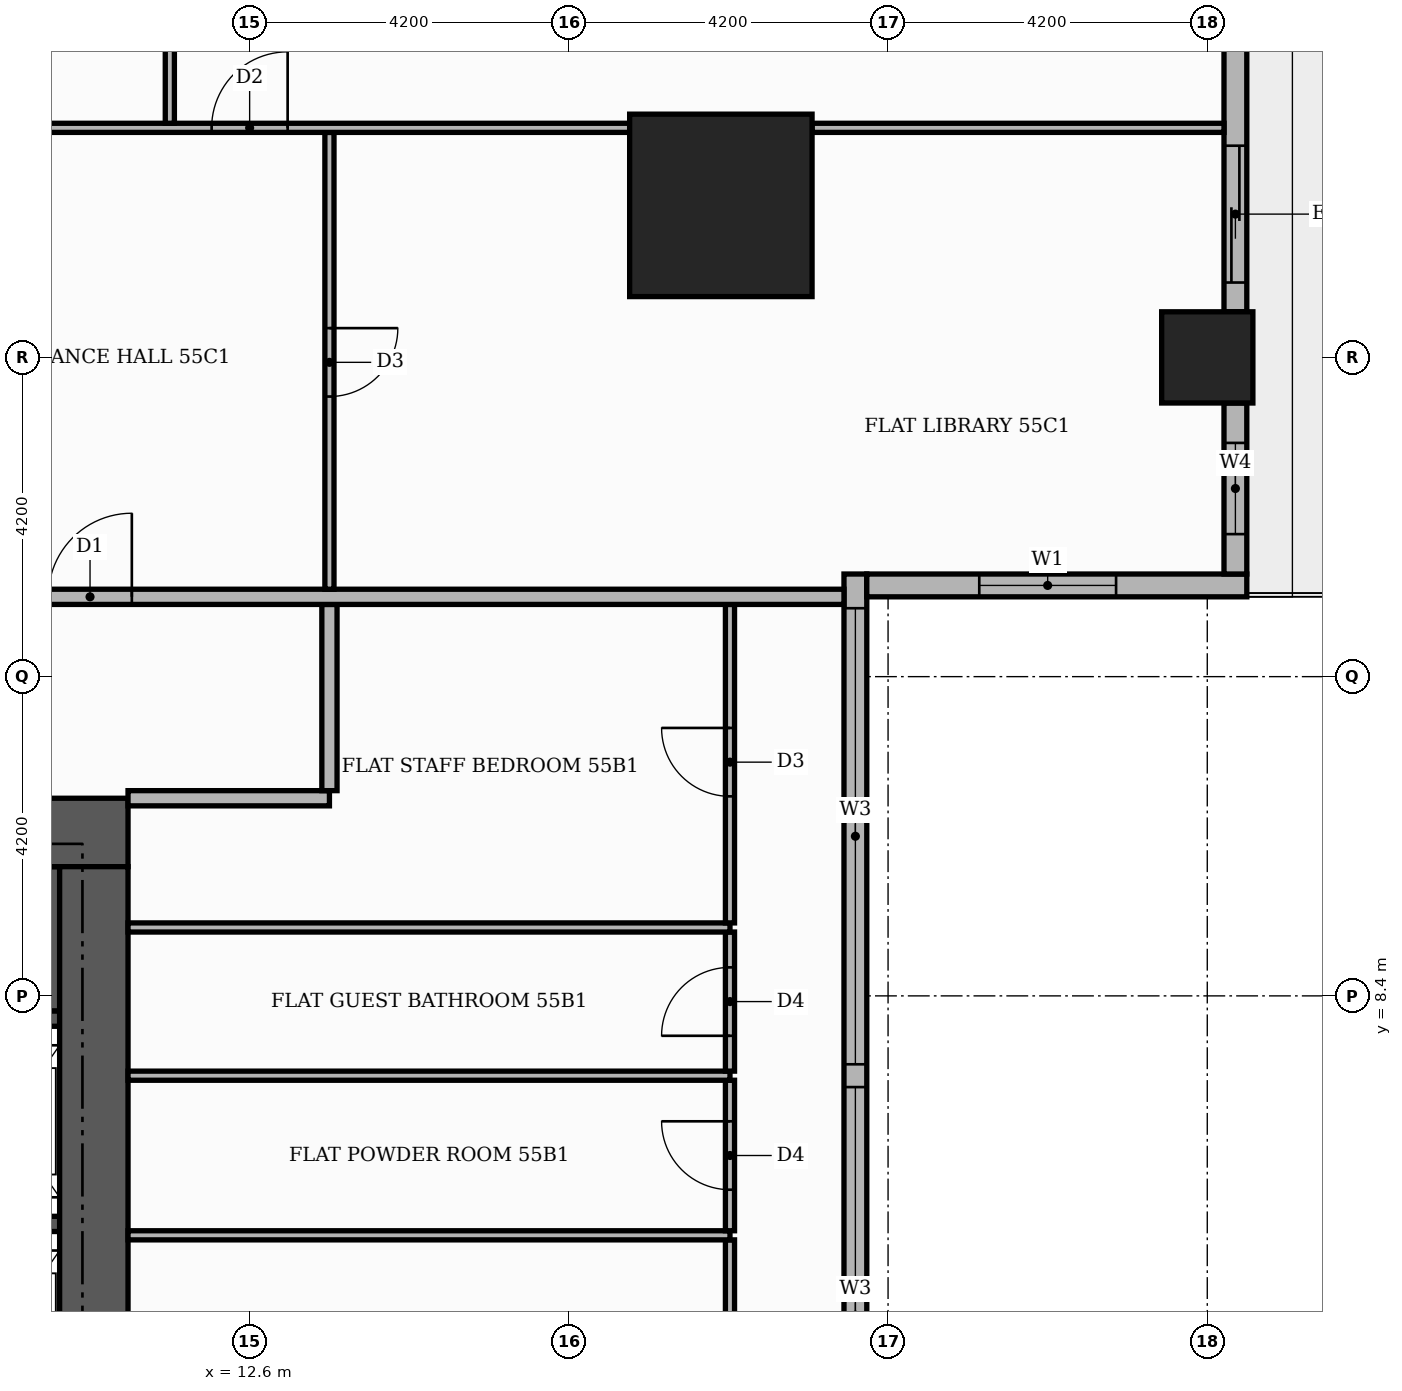
"""IFC4 building model, lengths in metres.
Left out: names, types, materials, properties, quantities, classifications, styles, units other than length and angle.
Written with IfcOpenShell. Run it as: python <this file> out.ifc"""

import sys

from ifc_helpers import new_model, si_unit, direction, frame, frame_2d, origin, origin_2d, place, context, subcontext, project, spatial, rectangle, extrude, element, fill, save


model = new_model("IFC4")
c1 = context("Model", 3, precision=1e-05, world=origin(), true_north=direction((0.0, 1.0)))
c2 = subcontext(c1, "Body", "Model", "MODEL_VIEW")
j1 = project(units=[si_unit("LENGTHUNIT", "METRE"), si_unit("PLANEANGLEUNIT", "RADIAN")], contexts=[c1])
p1 = place(None, origin())
s1 = spatial("IfcSite", under=j1, at=p1, CompositionType="ELEMENT")
p2 = place(p1, origin())
s2 = spatial("IfcBuilding", under=s1, at=p2, CompositionType="ELEMENT")
p3 = place(p2, frame((0.0, 0.0, 231.3)))
s3 = spatial("IfcBuildingStorey", under=s2, at=p3, CompositionType="ELEMENT", Elevation=231.3)
p4 = place(p3, frame((5.5, 9.15, 0.0), z_axis=(0.0, 0.0, 1.0), x_axis=(1.0, 0.0, 0.0)))
e1 = element("IfcWall", 1, at=p4, inside=s3, PredefinedType="SHEAR", context=c2, shape_type="SweptSolid", body=[
    extrude(rectangle(XDim=4.6, YDim=1.9, at=frame_2d((2.3, 0.0))), origin(), (0.0, 0.0, 1.0), 3.4),
])
for number, where, z_axis, x_axis in (
    (2, (8.1, 5.4, 0.0), (0.0, 0.0, 1.0), (1.0, 0.0, 0.0)),
    (3, (8.1, 8.1, 0.0), (0.0, 0.0, 1.0), (1.0, 0.0, 0.0)),
):
    element("IfcWall", number, at=place(p3, frame(where, z_axis=z_axis, x_axis=x_axis)), inside=s3, PredefinedType="SHEAR", context=c2, shape_type="SweptSolid", body=[
        extrude(rectangle(XDim=2.0, YDim=0.2, at=frame_2d((1.0, 0.0))), origin(), (0.0, 0.0, 1.0), 3.4),
    ])
p5 = place(p3, frame((-11.0, 10.55, 0.0), z_axis=(0.0, 0.0, 1.0), x_axis=(1.0, 0.0, 0.0)))
e4 = element("IfcWall", 4, at=p5, inside=s3, PredefinedType="SHEAR", context=c2, shape_type="SweptSolid", body=[
    extrude(rectangle(XDim=22.0, YDim=0.9, at=frame_2d((11.0, 0.0))), origin(), (0.0, 0.0, 1.0), 3.4),
])
p6 = place(p5, frame((13.3, 0.0, 0.0)))
e5 = element("IfcOpeningElement", 5, at=p6, cuts=e4, PredefinedType="OPENING", context=c2, shape_type="SweptSolid", body=[
    extrude(rectangle(XDim=1.8, YDim=2.2, at=frame_2d((0.9, 1.1))), frame((0.0, 0.46, 0.0), z_axis=(0.0, -1.0, 0.0), x_axis=(1.0, 0.0, 0.0)), (0.0, 0.0, 1.0), 0.92),
])
p7 = place(p3, frame((10.55, -10.1, 0.0), z_axis=(0.0, 0.0, 1.0), x_axis=(0.0, 1.0, 0.0)))
e6 = element("IfcWall", 6, at=p7, inside=s3, PredefinedType="SHEAR", context=c2, shape_type="SweptSolid", body=[
    extrude(rectangle(XDim=20.2, YDim=0.9, at=frame_2d((10.1, 0.0))), origin(), (0.0, 0.0, 1.0), 3.4),
])
p8 = place(p3, frame((18.8, 18.8, 0.0), z_axis=(0.0, 0.0, 1.0), x_axis=(1.0, 0.0, 0.0)))
e7 = element("IfcColumn", 7, at=p8, inside=s3, PredefinedType="COLUMN", context=c2, shape_type="SweptSolid", body=[
    extrude(rectangle(XDim=2.4, YDim=2.4, at=origin_2d()), origin(), (0.0, 0.0, 1.0), 3.9),
])
p9 = place(p3, frame((25.2, 16.8, 0.0), z_axis=(0.0, 0.0, 1.0), x_axis=(1.0, 0.0, 0.0)))
e8 = element("IfcColumn", 8, at=p9, inside=s3, PredefinedType="COLUMN", context=c2, shape_type="SweptSolid", body=[
    extrude(rectangle(XDim=1.2, YDim=1.2, at=origin_2d()), origin(), (0.0, 0.0, 1.0), 3.9),
])
p10 = place(p3, frame((20.57, -13.65, 0.0), z_axis=(0.0, 0.0, 1.0), x_axis=(0.0, 1.0, 0.0)))
e9 = element("IfcWall", 9, at=p10, inside=s3, PredefinedType="STANDARD", context=c2, shape_type="SweptSolid", body=[
    extrude(rectangle(XDim=27.6, YDim=0.3, at=frame_2d((13.8, 0.0))), origin(), (0.0, 0.0, 1.0), 3.4),
])
p11 = place(p10, frame((0.15, 0.0, 0.9)))
e10 = element("IfcOpeningElement", 10, at=p11, cuts=e9, PredefinedType="OPENING", context=c2, shape_type="SweptSolid", body=[
    extrude(rectangle(XDim=1.8, YDim=2.1, at=frame_2d((0.9, 1.05))), frame((0.0, 0.16, 0.0), z_axis=(0.0, -1.0, 0.0), x_axis=(1.0, 0.0, 0.0)), (0.0, 0.0, 1.0), 0.32),
])
p12 = place(p10, frame((2.25, 0.0, 0.9)))
e11 = element("IfcOpeningElement", 11, at=p12, cuts=e9, PredefinedType="OPENING", context=c2, shape_type="SweptSolid", body=[
    extrude(rectangle(XDim=6.0, YDim=2.1, at=frame_2d((3.0, 1.05))), frame((0.0, 0.16, 0.0), z_axis=(0.0, -1.0, 0.0), x_axis=(1.0, 0.0, 0.0)), (0.0, 0.0, 1.0), 0.32),
])
p13 = place(p10, frame((8.55, 0.0, 0.9)))
e12 = element("IfcOpeningElement", 12, at=p13, cuts=e9, PredefinedType="OPENING", context=c2, shape_type="SweptSolid", body=[
    extrude(rectangle(XDim=6.0, YDim=2.1, at=frame_2d((3.0, 1.05))), frame((0.0, 0.16, 0.0), z_axis=(0.0, -1.0, 0.0), x_axis=(1.0, 0.0, 0.0)), (0.0, 0.0, 1.0), 0.32),
])
p14 = place(p10, frame((14.85, 0.0, 0.9)))
e13 = element("IfcOpeningElement", 13, at=p14, cuts=e9, PredefinedType="OPENING", context=c2, shape_type="SweptSolid", body=[
    extrude(rectangle(XDim=6.0, YDim=2.1, at=frame_2d((3.0, 1.05))), frame((0.0, 0.16, 0.0), z_axis=(0.0, -1.0, 0.0), x_axis=(1.0, 0.0, 0.0)), (0.0, 0.0, 1.0), 0.32),
])
p15 = place(p10, frame((21.15, 0.0, 0.9)))
e14 = element("IfcOpeningElement", 14, at=p15, cuts=e9, PredefinedType="OPENING", context=c2, shape_type="SweptSolid", body=[
    extrude(rectangle(XDim=6.0, YDim=2.1, at=frame_2d((3.0, 1.05))), frame((0.0, 0.16, 0.0), z_axis=(0.0, -1.0, 0.0), x_axis=(1.0, 0.0, 0.0)), (0.0, 0.0, 1.0), 0.32),
])
p16 = place(p3, frame((20.72, 13.8, 0.0), z_axis=(0.0, 0.0, 1.0), x_axis=(1.0, 0.0, 0.0)))
e15 = element("IfcWall", 15, at=p16, inside=s3, PredefinedType="STANDARD", context=c2, shape_type="SweptSolid", body=[
    extrude(rectangle(XDim=5.0, YDim=0.3, at=frame_2d((2.5, 0.0))), origin(), (0.0, 0.0, 1.0), 3.4),
])
p17 = place(p16, frame((1.48, 0.0, 0.9)))
e16 = element("IfcOpeningElement", 16, at=p17, cuts=e15, PredefinedType="OPENING", context=c2, shape_type="SweptSolid", body=[
    extrude(rectangle(XDim=1.8, YDim=2.1, at=frame_2d((0.9, 1.05))), frame((0.0, 0.16, 0.0), z_axis=(0.0, -1.0, 0.0), x_axis=(1.0, 0.0, 0.0)), (0.0, 0.0, 1.0), 0.32),
])
p18 = place(p3, frame((25.57, 13.95, 0.0), z_axis=(0.0, 0.0, 1.0), x_axis=(0.0, 1.0, 0.0)))
e17 = element("IfcWall", 17, at=p18, inside=s3, PredefinedType="STANDARD", context=c2, shape_type="SweptSolid", body=[
    extrude(rectangle(XDim=2.25, YDim=0.3, at=frame_2d((1.125, 0.0))), origin(), (0.0, 0.0, 1.0), 3.4),
])
p19 = place(p18, frame((0.525, 0.0, 0.9)))
e18 = element("IfcOpeningElement", 18, at=p19, cuts=e17, PredefinedType="OPENING", context=c2, shape_type="SweptSolid", body=[
    extrude(rectangle(XDim=1.2, YDim=2.1, at=frame_2d((0.6, 1.05))), frame((0.0, 0.16, 0.0), z_axis=(0.0, -1.0, 0.0), x_axis=(1.0, 0.0, 0.0)), (0.0, 0.0, 1.0), 0.32),
])
p20 = place(p3, frame((25.57, 17.4, 0.0), z_axis=(0.0, 0.0, 1.0), x_axis=(0.0, 1.0, 0.0)))
e19 = element("IfcWall", 19, at=p20, inside=s3, PredefinedType="STANDARD", context=c2, shape_type="SweptSolid", body=[
    extrude(rectangle(XDim=3.82, YDim=0.3, at=frame_2d((1.91, 0.0))), origin(), (0.0, 0.0, 1.0), 3.4),
])
p21 = place(p20, frame((0.385, 0.0, 0.0)))
e20 = element("IfcOpeningElement", 20, at=p21, cuts=e19, PredefinedType="OPENING", context=c2, shape_type="SweptSolid", body=[
    extrude(rectangle(XDim=1.8, YDim=2.4, at=frame_2d((0.9, 1.2))), frame((0.0, 0.16, 0.0), z_axis=(0.0, -1.0, 0.0), x_axis=(1.0, 0.0, 0.0)), (0.0, 0.0, 1.0), 0.32),
])
p22 = place(p3, frame((18.92, 1.11, 0.0), z_axis=(0.0, 0.0, 1.0), x_axis=(0.0, 1.0, 0.0)))
e21 = element("IfcWall", 21, at=p22, inside=s3, PredefinedType="PARTITIONING", context=c2, shape_type="SweptSolid", body=[
    extrude(rectangle(XDim=4.08, YDim=0.12, at=frame_2d((2.04, 0.0))), origin(), (0.0, 0.0, 1.0), 3.4),
])
p23 = place(p22, frame((1.59, 0.0, 0.0)))
e22 = element("IfcOpeningElement", 22, at=p23, cuts=e21, PredefinedType="OPENING", context=c2, shape_type="SweptSolid", body=[
    extrude(rectangle(XDim=0.9, YDim=2.1, at=frame_2d((0.45, 1.05))), frame((0.0, 0.07, 0.0), z_axis=(0.0, -1.0, 0.0), x_axis=(1.0, 0.0, 0.0)), (0.0, 0.0, 1.0), 0.14),
])
p24 = place(p3, frame((11.0, 5.25, 0.0), z_axis=(0.0, 0.0, 1.0), x_axis=(1.0, 0.0, 0.0)))
e23 = element("IfcWall", 23, at=p24, inside=s3, PredefinedType="PARTITIONING", context=c2, shape_type="SweptSolid", body=[
    extrude(rectangle(XDim=7.92, YDim=0.12, at=frame_2d((3.96, 0.0))), origin(), (0.0, 0.0, 1.0), 3.4),
])
p25 = place(p3, frame((18.92, 5.31, 0.0), z_axis=(0.0, 0.0, 1.0), x_axis=(0.0, 1.0, 0.0)))
e24 = element("IfcWall", 24, at=p25, inside=s3, PredefinedType="PARTITIONING", context=c2, shape_type="SweptSolid", body=[
    extrude(rectangle(XDim=1.98, YDim=0.12, at=frame_2d((0.99, 0.0))), origin(), (0.0, 0.0, 1.0), 3.4),
])
p26 = place(p25, frame((0.54, 0.0, 0.0)))
e25 = element("IfcOpeningElement", 25, at=p26, cuts=e24, PredefinedType="OPENING", context=c2, shape_type="SweptSolid", body=[
    extrude(rectangle(XDim=0.9, YDim=2.1, at=frame_2d((0.45, 1.05))), frame((0.0, 0.07, 0.0), z_axis=(0.0, -1.0, 0.0), x_axis=(1.0, 0.0, 0.0)), (0.0, 0.0, 1.0), 0.14),
])
p27 = place(p3, frame((11.0, 7.35, 0.0), z_axis=(0.0, 0.0, 1.0), x_axis=(1.0, 0.0, 0.0)))
e26 = element("IfcWall", 26, at=p27, inside=s3, PredefinedType="PARTITIONING", context=c2, shape_type="SweptSolid", body=[
    extrude(rectangle(XDim=7.92, YDim=0.12, at=frame_2d((3.96, 0.0))), origin(), (0.0, 0.0, 1.0), 3.4),
])
p28 = place(p3, frame((18.92, 7.41, 0.0), z_axis=(0.0, 0.0, 1.0), x_axis=(0.0, 1.0, 0.0)))
e27 = element("IfcWall", 27, at=p28, inside=s3, PredefinedType="PARTITIONING", context=c2, shape_type="SweptSolid", body=[
    extrude(rectangle(XDim=1.83, YDim=0.12, at=frame_2d((0.915, 0.0))), origin(), (0.0, 0.0, 1.0), 3.4),
])
p29 = place(p28, frame((0.465, 0.0, 0.0)))
e28 = element("IfcOpeningElement", 28, at=p29, cuts=e27, PredefinedType="OPENING", context=c2, shape_type="SweptSolid", body=[
    extrude(rectangle(XDim=0.9, YDim=2.1, at=frame_2d((0.45, 1.05))), frame((0.0, 0.07, 0.0), z_axis=(0.0, -1.0, 0.0), x_axis=(1.0, 0.0, 0.0)), (0.0, 0.0, 1.0), 0.14),
])
p30 = place(p3, frame((11.0, 9.3, 0.0), z_axis=(0.0, 0.0, 1.0), x_axis=(1.0, 0.0, 0.0)))
e29 = element("IfcWall", 29, at=p30, inside=s3, PredefinedType="PARTITIONING", context=c2, shape_type="SweptSolid", body=[
    extrude(rectangle(XDim=7.92, YDim=0.12, at=frame_2d((3.96, 0.0))), origin(), (0.0, 0.0, 1.0), 3.4),
])
p31 = place(p3, frame((18.92, 9.36, 0.0), z_axis=(0.0, 0.0, 1.0), x_axis=(0.0, 1.0, 0.0)))
e30 = element("IfcWall", 30, at=p31, inside=s3, PredefinedType="PARTITIONING", context=c2, shape_type="SweptSolid", body=[
    extrude(rectangle(XDim=4.19, YDim=0.12, at=frame_2d((2.095, 0.0))), origin(), (0.0, 0.0, 1.0), 3.4),
])
p32 = place(p31, frame((1.665, 0.0, 0.0)))
e31 = element("IfcOpeningElement", 31, at=p32, cuts=e30, PredefinedType="OPENING", context=c2, shape_type="SweptSolid", body=[
    extrude(rectangle(XDim=0.9, YDim=2.1, at=frame_2d((0.45, 1.05))), frame((0.0, 0.07, 0.0), z_axis=(0.0, -1.0, 0.0), x_axis=(1.0, 0.0, 0.0)), (0.0, 0.0, 1.0), 0.14),
])
p33 = place(p3, frame((11.0, 11.0, 0.0), z_axis=(0.0, 0.0, 1.0), x_axis=(1.0, 0.0, 0.0)))
e32 = element("IfcWall", 32, at=p33, inside=s3, PredefinedType="PARTITIONING", context=c2, shape_type="SweptSolid", body=[
    extrude(rectangle(XDim=2.65, YDim=0.2, at=frame_2d((1.325, 0.0))), origin(), (0.0, 0.0, 1.0), 3.4),
])
p34 = place(p3, frame((13.65, 11.1, 0.0), z_axis=(0.0, 0.0, 1.0), x_axis=(0.0, 1.0, 0.0)))
e33 = element("IfcWall", 33, at=p34, inside=s3, PredefinedType="PARTITIONING", context=c2, shape_type="SweptSolid", body=[
    extrude(rectangle(XDim=2.45, YDim=0.2, at=frame_2d((1.225, 0.0))), origin(), (0.0, 0.0, 1.0), 3.4),
])
p35 = place(p3, frame((-13.65, 13.65, 0.0), z_axis=(0.0, 0.0, 1.0), x_axis=(1.0, 0.0, 0.0)))
e34 = element("IfcWall", 34, at=p35, inside=s3, PredefinedType="PARTITIONING", context=c2, shape_type="SweptSolid", body=[
    extrude(rectangle(XDim=34.07, YDim=0.2, at=frame_2d((17.035, 0.0))), origin(), (0.0, 0.0, 1.0), 3.4),
])
p36 = place(p35, frame((23.6, 0.0, 0.0)))
e35 = element("IfcOpeningElement", 35, at=p36, cuts=e34, PredefinedType="OPENING", context=c2, shape_type="SweptSolid", body=[
    extrude(rectangle(XDim=1.1, YDim=2.4, at=frame_2d((0.55, 1.2))), frame((0.0, 0.11, 0.0), z_axis=(0.0, -1.0, 0.0), x_axis=(1.0, 0.0, 0.0)), (0.0, 0.0, 1.0), 0.22),
])
p37 = place(p3, frame((13.65, 13.75, 0.0), z_axis=(0.0, 0.0, 1.0), x_axis=(0.0, 1.0, 0.0)))
e36 = element("IfcWall", 36, at=p37, inside=s3, PredefinedType="PARTITIONING", context=c2, shape_type="SweptSolid", body=[
    extrude(rectangle(XDim=6.01, YDim=0.12, at=frame_2d((3.005, 0.0))), origin(), (0.0, 0.0, 1.0), 3.4),
])
p38 = place(p37, frame((2.535, 0.0, 0.0)))
e37 = element("IfcOpeningElement", 37, at=p38, cuts=e36, PredefinedType="OPENING", context=c2, shape_type="SweptSolid", body=[
    extrude(rectangle(XDim=0.9, YDim=2.1, at=frame_2d((0.45, 1.05))), frame((0.0, 0.07, 0.0), z_axis=(0.0, -1.0, 0.0), x_axis=(1.0, 0.0, 0.0)), (0.0, 0.0, 1.0), 0.14),
])
p39 = place(p3, frame((-13.55, 19.82, 0.0), z_axis=(0.0, 0.0, 1.0), x_axis=(1.0, 0.0, 0.0)))
e38 = element("IfcWall", 38, at=p39, inside=s3, PredefinedType="PARTITIONING", context=c2, shape_type="SweptSolid", body=[
    extrude(rectangle(XDim=31.15, YDim=0.12, at=frame_2d((15.575, 0.0))), origin(), (0.0, 0.0, 1.0), 3.4),
])
p40 = place(p39, frame((25.65, 0.0, 0.0)))
e39 = element("IfcOpeningElement", 39, at=p40, cuts=e38, PredefinedType="OPENING", context=c2, shape_type="SweptSolid", body=[
    extrude(rectangle(XDim=1.0, YDim=2.1, at=frame_2d((0.5, 1.05))), frame((0.0, 0.07, 0.0), z_axis=(0.0, -1.0, 0.0), x_axis=(1.0, 0.0, 0.0)), (0.0, 0.0, 1.0), 0.14),
])
p41 = place(p39, frame((22.55, 0.0, 0.0)))
e40 = element("IfcOpeningElement", 40, at=p41, cuts=e38, PredefinedType="OPENING", context=c2, shape_type="SweptSolid", body=[
    extrude(rectangle(XDim=0.9, YDim=2.1, at=frame_2d((0.45, 1.05))), frame((0.0, 0.07, 0.0), z_axis=(0.0, -1.0, 0.0), x_axis=(1.0, 0.0, 0.0)), (0.0, 0.0, 1.0), 0.14),
])
p42 = place(p39, frame((18.35, 0.0, 0.0)))
e41 = element("IfcOpeningElement", 41, at=p42, cuts=e38, PredefinedType="OPENING", context=c2, shape_type="SweptSolid", body=[
    extrude(rectangle(XDim=0.9, YDim=2.1, at=frame_2d((0.45, 1.05))), frame((0.0, 0.07, 0.0), z_axis=(0.0, -1.0, 0.0), x_axis=(1.0, 0.0, 0.0)), (0.0, 0.0, 1.0), 0.14),
])
p43 = place(p39, frame((9.95, 0.0, 0.0)))
e42 = element("IfcOpeningElement", 42, at=p43, cuts=e38, PredefinedType="OPENING", context=c2, shape_type="SweptSolid", body=[
    extrude(rectangle(XDim=0.9, YDim=2.1, at=frame_2d((0.45, 1.05))), frame((0.0, 0.07, 0.0), z_axis=(0.0, -1.0, 0.0), x_axis=(1.0, 0.0, 0.0)), (0.0, 0.0, 1.0), 0.14),
])
p44 = place(p39, frame((3.65, 0.0, 0.0)))
e43 = element("IfcOpeningElement", 43, at=p44, cuts=e38, PredefinedType="OPENING", context=c2, shape_type="SweptSolid", body=[
    extrude(rectangle(XDim=0.9, YDim=2.1, at=frame_2d((0.45, 1.05))), frame((0.0, 0.07, 0.0), z_axis=(0.0, -1.0, 0.0), x_axis=(1.0, 0.0, 0.0)), (0.0, 0.0, 1.0), 0.14),
])
p45 = place(p3, frame((20.0, 19.82, 0.0), z_axis=(0.0, 0.0, 1.0), x_axis=(1.0, 0.0, 0.0)))
e44 = element("IfcWall", 44, at=p45, inside=s3, PredefinedType="PARTITIONING", context=c2, shape_type="SweptSolid", body=[
    extrude(rectangle(XDim=5.42, YDim=0.12, at=frame_2d((2.71, 0.0))), origin(), (0.0, 0.0, 1.0), 3.4),
])
p46 = place(p3, frame((11.55, 19.88, 0.0), z_axis=(0.0, 0.0, 1.0), x_axis=(0.0, 1.0, 0.0)))
e45 = element("IfcWall", 45, at=p46, inside=s3, PredefinedType="PARTITIONING", context=c2, shape_type="SweptSolid", body=[
    extrude(rectangle(XDim=5.54, YDim=0.12, at=frame_2d((2.77, 0.0))), origin(), (0.0, 0.0, 1.0), 3.4),
])
p47 = place(p14, origin())
e46 = element("IfcWindow", 46, at=p47, inside=s3, PartitioningType="SINGLE_PANEL", PredefinedType="WINDOW", context=c2, shape_type="SweptSolid", body=[
    extrude(rectangle(XDim=6.0, YDim=2.1, at=frame_2d((3.0, 1.05))), frame((0.0, 0.03, 0.0), z_axis=(0.0, -1.0, 0.0), x_axis=(1.0, 0.0, 0.0)), (0.0, 0.0, 1.0), 0.06),
])
fill(e13, e46)
p48 = place(p15, origin())
e47 = element("IfcWindow", 47, at=p48, inside=s3, PartitioningType="SINGLE_PANEL", PredefinedType="WINDOW", context=c2, shape_type="SweptSolid", body=[
    extrude(rectangle(XDim=6.0, YDim=2.1, at=frame_2d((3.0, 1.05))), frame((0.0, 0.03, 0.0), z_axis=(0.0, -1.0, 0.0), x_axis=(1.0, 0.0, 0.0)), (0.0, 0.0, 1.0), 0.06),
])
fill(e14, e47)
p49 = place(p17, origin())
e48 = element("IfcWindow", 48, at=p49, inside=s3, PartitioningType="SINGLE_PANEL", PredefinedType="WINDOW", context=c2, shape_type="SweptSolid", body=[
    extrude(rectangle(XDim=1.8, YDim=2.1, at=frame_2d((0.9, 1.05))), frame((0.0, 0.03, 0.0), z_axis=(0.0, -1.0, 0.0), x_axis=(1.0, 0.0, 0.0)), (0.0, 0.0, 1.0), 0.06),
])
fill(e16, e48)
p50 = place(p19, origin())
e49 = element("IfcWindow", 49, at=p50, inside=s3, PartitioningType="SINGLE_PANEL", PredefinedType="WINDOW", context=c2, shape_type="SweptSolid", body=[
    extrude(rectangle(XDim=1.2, YDim=2.1, at=frame_2d((0.6, 1.05))), frame((0.0, 0.03, 0.0), z_axis=(0.0, -1.0, 0.0), x_axis=(1.0, 0.0, 0.0)), (0.0, 0.0, 1.0), 0.06),
])
fill(e18, e49)
p51 = place(p21, origin())
e50 = element("IfcDoor", 50, at=p51, inside=s3, OperationType="SLIDING_TO_LEFT", PredefinedType="DOOR", context=c2, shape_type="SweptSolid", body=[
    extrude(rectangle(XDim=1.8, YDim=2.4, at=frame_2d((0.9, 1.2))), frame((0.0, 0.025, 0.0), z_axis=(0.0, -1.0, 0.0), x_axis=(1.0, 0.0, 0.0)), (0.0, 0.0, 1.0), 0.05),
])
fill(e20, e50)
p52 = place(p26, origin())
e51 = element("IfcDoor", 51, at=p52, inside=s3, OperationType="SINGLE_SWING_RIGHT", PredefinedType="DOOR", context=c2, shape_type="SweptSolid", body=[
    extrude(rectangle(XDim=0.9, YDim=2.1, at=frame_2d((0.45, 1.05))), frame((0.0, 0.025, 0.0), z_axis=(0.0, -1.0, 0.0), x_axis=(1.0, 0.0, 0.0)), (0.0, 0.0, 1.0), 0.05),
])
fill(e25, e51)
p53 = place(p29, origin())
e52 = element("IfcDoor", 52, at=p53, inside=s3, OperationType="SINGLE_SWING_LEFT", PredefinedType="DOOR", context=c2, shape_type="SweptSolid", body=[
    extrude(rectangle(XDim=0.9, YDim=2.1, at=frame_2d((0.45, 1.05))), frame((0.0, 0.025, 0.0), z_axis=(0.0, -1.0, 0.0), x_axis=(1.0, 0.0, 0.0)), (0.0, 0.0, 1.0), 0.05),
])
fill(e28, e52)
p54 = place(p32, origin())
e53 = element("IfcDoor", 53, at=p54, inside=s3, OperationType="SINGLE_SWING_RIGHT", PredefinedType="DOOR", context=c2, shape_type="SweptSolid", body=[
    extrude(rectangle(XDim=0.9, YDim=2.1, at=frame_2d((0.45, 1.05))), frame((0.0, 0.025, 0.0), z_axis=(0.0, -1.0, 0.0), x_axis=(1.0, 0.0, 0.0)), (0.0, 0.0, 1.0), 0.05),
])
fill(e31, e53)
p55 = place(p36, origin())
e54 = element("IfcDoor", 54, at=p55, inside=s3, OperationType="SINGLE_SWING_RIGHT", PredefinedType="DOOR", context=c2, shape_type="SweptSolid", body=[
    extrude(rectangle(XDim=1.1, YDim=2.4, at=frame_2d((0.55, 1.2))), frame((0.0, 0.025, 0.0), z_axis=(0.0, -1.0, 0.0), x_axis=(1.0, 0.0, 0.0)), (0.0, 0.0, 1.0), 0.05),
])
fill(e35, e54)
p56 = place(p38, frame((0.9, 0.0, 0.0), z_axis=(0.0, 0.0, 1.0), x_axis=(-1.0, 0.0, 0.0)))
e55 = element("IfcDoor", 55, at=p56, inside=s3, OperationType="SINGLE_SWING_RIGHT", PredefinedType="DOOR", context=c2, shape_type="SweptSolid", body=[
    extrude(rectangle(XDim=0.9, YDim=2.1, at=frame_2d((0.45, 1.05))), frame((0.0, 0.025, 0.0), z_axis=(0.0, -1.0, 0.0), x_axis=(1.0, 0.0, 0.0)), (0.0, 0.0, 1.0), 0.05),
])
fill(e37, e55)
p57 = place(p40, origin())
e56 = element("IfcDoor", 56, at=p57, inside=s3, OperationType="SINGLE_SWING_RIGHT", PredefinedType="DOOR", context=c2, shape_type="SweptSolid", body=[
    extrude(rectangle(XDim=1.0, YDim=2.1, at=frame_2d((0.5, 1.05))), frame((0.0, 0.025, 0.0), z_axis=(0.0, -1.0, 0.0), x_axis=(1.0, 0.0, 0.0)), (0.0, 0.0, 1.0), 0.05),
])
fill(e39, e56)
save(model, sys.argv[1])
